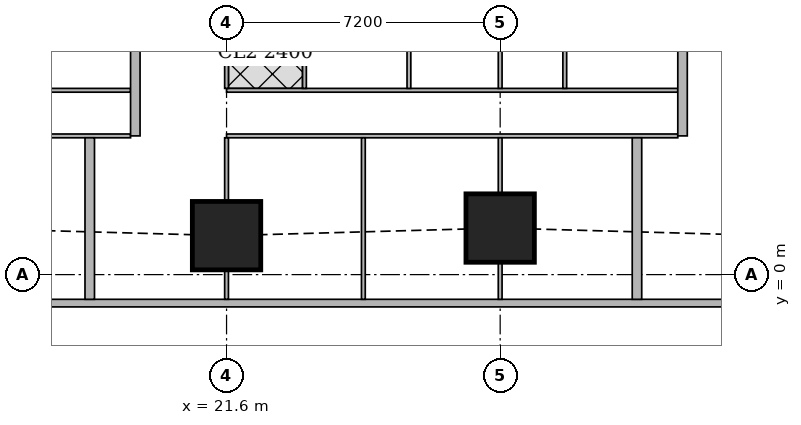
"""IFC4 building model, lengths in metres.
Left out: names, types, materials, properties, quantities, classifications, styles, units other than length and angle.
Written with IfcOpenShell. Run it as: python <this file> out.ifc"""

import sys

from ifc_helpers import new_model, si_unit, direction, frame, frame_2d, origin, origin_2d, place, context, subcontext, project, spatial, rectangle, extrude, element, fill, save


model = new_model("IFC4")
c1 = context("Model", 3, precision=1e-05, world=origin(), true_north=direction((0.0, 1.0)))
c2 = subcontext(c1, "Body", "Model", "MODEL_VIEW")
j1 = project(units=[si_unit("LENGTHUNIT", "METRE"), si_unit("PLANEANGLEUNIT", "RADIAN")], contexts=[c1])
p1 = place(None, origin())
s1 = spatial("IfcSite", under=j1, at=p1, CompositionType="ELEMENT")
p2 = place(p1, origin())
s2 = spatial("IfcBuilding", under=s1, at=p2, CompositionType="ELEMENT")
p3 = place(p2, frame((0.0, 0.0, 158.3)))
s3 = spatial("IfcBuildingStorey", under=s2, at=p3, CompositionType="ELEMENT", Elevation=158.3)
for number, where, z_axis, x_axis in (
    (1, (21.6, 1.025, 0.0), (0.0, 0.0, 1.0), (1.0, 0.0, 0.0)),
    (2, (28.8, 1.225, 0.0), (0.0, 0.0, 1.0), (1.0, 0.0, 0.0)),
):
    element("IfcColumn", number, at=place(p3, frame(where, z_axis=z_axis, x_axis=x_axis)), inside=s3, PredefinedType="COLUMN", context=c2, shape_type="SweptSolid", body=[
        extrude(rectangle(XDim=1.8, YDim=1.8, at=origin_2d()), origin(), (0.0, 0.0, 1.0), 3.75),
    ])
p4 = place(p3, frame((2.163, -0.75, 0.0), z_axis=(0.0, 0.0, 1.0), x_axis=(1.0, 0.0, 0.0)))
e3 = element("IfcWall", 3, at=p4, inside=s3, PredefinedType="SOLIDWALL", context=c2, shape_type="SweptSolid", body=[
    extrude(rectangle(XDim=45.628, YDim=0.2, at=frame_2d((22.814, 0.0))), origin(), (0.0, 0.0, 1.0), 3.5),
])
p5 = place(p4, frame((9.537, 0.0, 0.9)))
e4 = element("IfcOpeningElement", 4, at=p5, cuts=e3, PredefinedType="OPENING", context=c2, shape_type="SweptSolid", body=[
    extrude(rectangle(XDim=1.8, YDim=1.5, at=frame_2d((0.9, 0.75))), frame((0.0, 0.11, 0.0), z_axis=(0.0, -1.0, 0.0), x_axis=(1.0, 0.0, 0.0)), (0.0, 0.0, 1.0), 0.22),
])
p6 = place(p4, frame((13.137, 0.0, 0.9)))
e5 = element("IfcOpeningElement", 5, at=p6, cuts=e3, PredefinedType="OPENING", context=c2, shape_type="SweptSolid", body=[
    extrude(rectangle(XDim=1.8, YDim=1.5, at=frame_2d((0.9, 0.75))), frame((0.0, 0.11, 0.0), z_axis=(0.0, -1.0, 0.0), x_axis=(1.0, 0.0, 0.0)), (0.0, 0.0, 1.0), 0.22),
])
p7 = place(p4, frame((16.737, 0.0, 0.9)))
e6 = element("IfcOpeningElement", 6, at=p7, cuts=e3, PredefinedType="OPENING", context=c2, shape_type="SweptSolid", body=[
    extrude(rectangle(XDim=1.8, YDim=1.5, at=frame_2d((0.9, 0.75))), frame((0.0, 0.11, 0.0), z_axis=(0.0, -1.0, 0.0), x_axis=(1.0, 0.0, 0.0)), (0.0, 0.0, 1.0), 0.22),
])
p8 = place(p4, frame((20.337, 0.0, 0.9)))
e7 = element("IfcOpeningElement", 7, at=p8, cuts=e3, PredefinedType="OPENING", context=c2, shape_type="SweptSolid", body=[
    extrude(rectangle(XDim=1.8, YDim=1.5, at=frame_2d((0.9, 0.75))), frame((0.0, 0.11, 0.0), z_axis=(0.0, -1.0, 0.0), x_axis=(1.0, 0.0, 0.0)), (0.0, 0.0, 1.0), 0.22),
])
p9 = place(p4, frame((23.937, 0.0, 0.9)))
e8 = element("IfcOpeningElement", 8, at=p9, cuts=e3, PredefinedType="OPENING", context=c2, shape_type="SweptSolid", body=[
    extrude(rectangle(XDim=1.8, YDim=1.5, at=frame_2d((0.9, 0.75))), frame((0.0, 0.11, 0.0), z_axis=(0.0, -1.0, 0.0), x_axis=(1.0, 0.0, 0.0)), (0.0, 0.0, 1.0), 0.22),
])
p10 = place(p4, frame((27.537, 0.0, 0.9)))
e9 = element("IfcOpeningElement", 9, at=p10, cuts=e3, PredefinedType="OPENING", context=c2, shape_type="SweptSolid", body=[
    extrude(rectangle(XDim=1.8, YDim=1.5, at=frame_2d((0.9, 0.75))), frame((0.0, 0.11, 0.0), z_axis=(0.0, -1.0, 0.0), x_axis=(1.0, 0.0, 0.0)), (0.0, 0.0, 1.0), 0.22),
])
p11 = place(p4, frame((31.137, 0.0, 0.9)))
e10 = element("IfcOpeningElement", 10, at=p11, cuts=e3, PredefinedType="OPENING", context=c2, shape_type="SweptSolid", body=[
    extrude(rectangle(XDim=1.8, YDim=1.5, at=frame_2d((0.9, 0.75))), frame((0.0, 0.11, 0.0), z_axis=(0.0, -1.0, 0.0), x_axis=(1.0, 0.0, 0.0)), (0.0, 0.0, 1.0), 0.22),
])
p12 = place(p4, frame((34.737, 0.0, 0.9)))
e11 = element("IfcOpeningElement", 11, at=p12, cuts=e3, PredefinedType="OPENING", context=c2, shape_type="SweptSolid", body=[
    extrude(rectangle(XDim=1.8, YDim=1.5, at=frame_2d((0.9, 0.75))), frame((0.0, 0.11, 0.0), z_axis=(0.0, -1.0, 0.0), x_axis=(1.0, 0.0, 0.0)), (0.0, 0.0, 1.0), 0.22),
])
p13 = place(p3, frame((33.623, 43.022, 0.0), z_axis=(0.0, 0.0, 1.0), x_axis=(0.185596841028, -0.98262597798, 0.0)))
e12 = element("IfcWall", 12, at=p13, inside=s3, PredefinedType="SOLIDWALL", context=c2, shape_type="SweptSolid", body=[
    extrude(rectangle(XDim=41.66, YDim=0.15, at=frame_2d((20.83, 0.0))), origin(), (0.0, 0.0, 1.0), 2.5),
])
p14 = place(p13, frame((21.514, 0.0, 0.0)))
e13 = element("IfcOpeningElement", 13, at=p14, cuts=e12, PredefinedType="OPENING", context=c2, shape_type="SweptSolid", body=[
    extrude(rectangle(XDim=1.0, YDim=2.1, at=frame_2d((0.5, 1.05))), frame((0.0, 0.085, 0.0), z_axis=(0.0, -1.0, 0.0), x_axis=(1.0, 0.0, 0.0)), (0.0, 0.0, 1.0), 0.17),
])
p15 = place(p13, frame((27.062, 0.0, 0.0)))
e14 = element("IfcOpeningElement", 14, at=p15, cuts=e12, PredefinedType="OPENING", context=c2, shape_type="SweptSolid", body=[
    extrude(rectangle(XDim=1.0, YDim=2.1, at=frame_2d((0.5, 1.05))), frame((0.0, 0.085, 0.0), z_axis=(0.0, -1.0, 0.0), x_axis=(1.0, 0.0, 0.0)), (0.0, 0.0, 1.0), 0.17),
])
p16 = place(p13, frame((29.934, 0.0, 0.0)))
e15 = element("IfcOpeningElement", 15, at=p16, cuts=e12, PredefinedType="OPENING", context=c2, shape_type="SweptSolid", body=[
    extrude(rectangle(XDim=1.0, YDim=2.1, at=frame_2d((0.5, 1.05))), frame((0.0, 0.085, 0.0), z_axis=(0.0, -1.0, 0.0), x_axis=(1.0, 0.0, 0.0)), (0.0, 0.0, 1.0), 0.17),
])
p17 = place(p3, frame((19.074, 3.65, 0.0), z_axis=(0.0, 0.0, 1.0), x_axis=(-1.0, 0.0, 0.0)))
e16 = element("IfcWall", 16, at=p17, inside=s3, PredefinedType="PARTITIONING", context=c2, shape_type="SweptSolid", body=[
    extrude(rectangle(XDim=4.674, YDim=0.1, at=frame_2d((2.337, 0.0))), origin(), (0.0, 0.0, 1.0), 3.5),
])
p18 = place(p17, frame((3.574, 0.0, 0.0)))
e17 = element("IfcOpeningElement", 17, at=p18, cuts=e16, PredefinedType="OPENING", context=c2, shape_type="SweptSolid", body=[
    extrude(rectangle(XDim=0.9, YDim=2.1, at=frame_2d((0.45, 1.05))), frame((0.0, 0.06, 0.0), z_axis=(0.0, -1.0, 0.0), x_axis=(1.0, 0.0, 0.0)), (0.0, 0.0, 1.0), 0.12),
])
p19 = place(p3, frame((19.074, 4.85, 0.0), z_axis=(0.0, 0.0, 1.0), x_axis=(-1.0, 0.0, 0.0)))
e18 = element("IfcWall", 18, at=p19, inside=s3, PredefinedType="PARTITIONING", context=c2, shape_type="SweptSolid", body=[
    extrude(rectangle(XDim=4.674, YDim=0.1, at=frame_2d((2.337, 0.0))), origin(), (0.0, 0.0, 1.0), 3.5),
])
p20 = place(p19, frame((3.199, 0.0, 0.0)))
e19 = element("IfcOpeningElement", 19, at=p20, cuts=e18, PredefinedType="OPENING", context=c2, shape_type="SweptSolid", body=[
    extrude(rectangle(XDim=0.9, YDim=2.1, at=frame_2d((0.45, 1.05))), frame((0.0, 0.06, 0.0), z_axis=(0.0, -1.0, 0.0), x_axis=(1.0, 0.0, 0.0)), (0.0, 0.0, 1.0), 0.12),
])
p21 = place(p19, frame((0.799, 0.0, 0.0)))
e20 = element("IfcOpeningElement", 20, at=p21, cuts=e18, PredefinedType="OPENING", context=c2, shape_type="SweptSolid", body=[
    extrude(rectangle(XDim=0.9, YDim=2.1, at=frame_2d((0.45, 1.05))), frame((0.0, 0.06, 0.0), z_axis=(0.0, -1.0, 0.0), x_axis=(1.0, 0.0, 0.0)), (0.0, 0.0, 1.0), 0.12),
])
p22 = place(p3, frame((33.474, 3.65, 0.0), z_axis=(0.0, 0.0, 1.0), x_axis=(-1.0, 0.0, 0.0)))
e21 = element("IfcWall", 21, at=p22, inside=s3, PredefinedType="PARTITIONING", context=c2, shape_type="SweptSolid", body=[
    extrude(rectangle(XDim=11.874, YDim=0.1, at=frame_2d((5.937, 0.0))), origin(), (0.0, 0.0, 1.0), 3.5),
])
p23 = place(p22, frame((10.774, 0.0, 0.0)))
e22 = element("IfcOpeningElement", 22, at=p23, cuts=e21, PredefinedType="OPENING", context=c2, shape_type="SweptSolid", body=[
    extrude(rectangle(XDim=0.9, YDim=2.1, at=frame_2d((0.45, 1.05))), frame((0.0, 0.06, 0.0), z_axis=(0.0, -1.0, 0.0), x_axis=(1.0, 0.0, 0.0)), (0.0, 0.0, 1.0), 0.12),
])
p24 = place(p22, frame((7.174, 0.0, 0.0)))
e23 = element("IfcOpeningElement", 23, at=p24, cuts=e21, PredefinedType="OPENING", context=c2, shape_type="SweptSolid", body=[
    extrude(rectangle(XDim=0.9, YDim=2.1, at=frame_2d((0.45, 1.05))), frame((0.0, 0.06, 0.0), z_axis=(0.0, -1.0, 0.0), x_axis=(1.0, 0.0, 0.0)), (0.0, 0.0, 1.0), 0.12),
])
p25 = place(p22, frame((3.574, 0.0, 0.0)))
e24 = element("IfcOpeningElement", 24, at=p25, cuts=e21, PredefinedType="OPENING", context=c2, shape_type="SweptSolid", body=[
    extrude(rectangle(XDim=0.9, YDim=2.1, at=frame_2d((0.45, 1.05))), frame((0.0, 0.06, 0.0), z_axis=(0.0, -1.0, 0.0), x_axis=(1.0, 0.0, 0.0)), (0.0, 0.0, 1.0), 0.12),
])
p26 = place(p3, frame((33.474, 4.85, 0.0), z_axis=(0.0, 0.0, 1.0), x_axis=(-1.0, 0.0, 0.0)))
e25 = element("IfcWall", 25, at=p26, inside=s3, PredefinedType="PARTITIONING", context=c2, shape_type="SweptSolid", body=[
    extrude(rectangle(XDim=11.874, YDim=0.1, at=frame_2d((5.937, 0.0))), origin(), (0.0, 0.0, 1.0), 3.5),
])
p27 = place(p26, frame((10.399, 0.0, 0.0)))
e26 = element("IfcOpeningElement", 26, at=p27, cuts=e25, PredefinedType="OPENING", context=c2, shape_type="SweptSolid", body=[
    extrude(rectangle(XDim=0.9, YDim=2.1, at=frame_2d((0.45, 1.05))), frame((0.0, 0.06, 0.0), z_axis=(0.0, -1.0, 0.0), x_axis=(1.0, 0.0, 0.0)), (0.0, 0.0, 1.0), 0.12),
])
p28 = place(p26, frame((5.425, 0.0, 0.0)))
e27 = element("IfcOpeningElement", 27, at=p28, cuts=e25, PredefinedType="OPENING", context=c2, shape_type="SweptSolid", body=[
    extrude(rectangle(XDim=0.9, YDim=2.1, at=frame_2d((0.45, 1.05))), frame((0.0, 0.06, 0.0), z_axis=(0.0, -1.0, 0.0), x_axis=(1.0, 0.0, 0.0)), (0.0, 0.0, 1.0), 0.12),
])
p29 = place(p26, frame((3.374, 0.0, 0.0)))
e28 = element("IfcOpeningElement", 28, at=p29, cuts=e25, PredefinedType="OPENING", context=c2, shape_type="SweptSolid", body=[
    extrude(rectangle(XDim=0.9, YDim=2.1, at=frame_2d((0.45, 1.05))), frame((0.0, 0.06, 0.0), z_axis=(0.0, -1.0, 0.0), x_axis=(1.0, 0.0, 0.0)), (0.0, 0.0, 1.0), 0.12),
])
p30 = place(p26, frame((8.0, 0.0, 0.0)))
e29 = element("IfcOpeningElement", 29, at=p30, cuts=e25, PredefinedType="OPENING", context=c2, shape_type="SweptSolid", body=[
    extrude(rectangle(XDim=0.9, YDim=2.1, at=frame_2d((0.45, 1.05))), frame((0.0, 0.06, 0.0), z_axis=(0.0, -1.0, 0.0), x_axis=(1.0, 0.0, 0.0)), (0.0, 0.0, 1.0), 0.12),
])
p31 = place(p26, frame((0.975, 0.0, 0.0)))
e30 = element("IfcOpeningElement", 30, at=p31, cuts=e25, PredefinedType="OPENING", context=c2, shape_type="SweptSolid", body=[
    extrude(rectangle(XDim=0.9, YDim=2.1, at=frame_2d((0.45, 1.05))), frame((0.0, 0.06, 0.0), z_axis=(0.0, -1.0, 0.0), x_axis=(1.0, 0.0, 0.0)), (0.0, 0.0, 1.0), 0.12),
])
p32 = place(p3, frame((21.6, -0.65, 0.0), z_axis=(0.0, 0.0, 1.0), x_axis=(0.0, 1.0, 0.0)))
e31 = element("IfcWall", 31, at=p32, inside=s3, PredefinedType="PARTITIONING", context=c2, shape_type="SweptSolid", body=[
    extrude(rectangle(XDim=0.774, YDim=0.1, at=frame_2d((0.387, 0.0))), origin(), (0.0, 0.0, 1.0), 3.5),
])
p33 = place(p3, frame((21.6, 1.926, 0.0), z_axis=(0.0, 0.0, 1.0), x_axis=(0.0, 1.0, 0.0)))
e32 = element("IfcWall", 32, at=p33, inside=s3, PredefinedType="PARTITIONING", context=c2, shape_type="SweptSolid", body=[
    extrude(rectangle(XDim=1.674, YDim=0.1, at=frame_2d((0.837, 0.0))), origin(), (0.0, 0.0, 1.0), 3.5),
])
p34 = place(p3, frame((25.2, -0.65, 0.0), z_axis=(0.0, 0.0, 1.0), x_axis=(0.0, 1.0, 0.0)))
e33 = element("IfcWall", 33, at=p34, inside=s3, PredefinedType="PARTITIONING", context=c2, shape_type="SweptSolid", body=[
    extrude(rectangle(XDim=4.25, YDim=0.1, at=frame_2d((2.125, 0.0))), origin(), (0.0, 0.0, 1.0), 2.1),
])
p35 = place(p3, frame((28.8, -0.65, 0.0), z_axis=(0.0, 0.0, 1.0), x_axis=(0.0, 1.0, 0.0)))
e34 = element("IfcWall", 34, at=p35, inside=s3, PredefinedType="PARTITIONING", context=c2, shape_type="SweptSolid", body=[
    extrude(rectangle(XDim=0.974, YDim=0.1, at=frame_2d((0.487, 0.0))), origin(), (0.0, 0.0, 1.0), 3.5),
])
p36 = place(p3, frame((28.8, 2.126, 0.0), z_axis=(0.0, 0.0, 1.0), x_axis=(0.0, 1.0, 0.0)))
e35 = element("IfcWall", 35, at=p36, inside=s3, PredefinedType="PARTITIONING", context=c2, shape_type="SweptSolid", body=[
    extrude(rectangle(XDim=1.474, YDim=0.1, at=frame_2d((0.737, 0.0))), origin(), (0.0, 0.0, 1.0), 3.5),
])
p37 = place(p3, frame((21.6, 4.9, 0.0), z_axis=(0.0, 0.0, 1.0), x_axis=(0.0, 1.0, 0.0)))
e36 = element("IfcWall", 36, at=p37, inside=s3, PredefinedType="PARTITIONING", context=c2, shape_type="SweptSolid", body=[
    extrude(rectangle(XDim=1.849, YDim=0.1, at=frame_2d((0.925, 0.0))), origin(), (0.0, 0.0, 1.0), 3.5),
])
p38 = place(p3, frame((26.399, 4.9, 0.0), z_axis=(0.0, 0.0, 1.0), x_axis=(0.0, 1.0, 0.0)))
e37 = element("IfcWall", 37, at=p38, inside=s3, PredefinedType="PARTITIONING", context=c2, shape_type="SweptSolid", body=[
    extrude(rectangle(XDim=3.525, YDim=0.1, at=frame_2d((1.763, 0.0))), origin(), (0.0, 0.0, 1.0), 3.5),
])
p39 = place(p3, frame((28.8, 4.9, 0.0), z_axis=(0.0, 0.0, 1.0), x_axis=(0.0, 1.0, 0.0)))
e38 = element("IfcWall", 38, at=p39, inside=s3, PredefinedType="PARTITIONING", context=c2, shape_type="SweptSolid", body=[
    extrude(rectangle(XDim=1.849, YDim=0.1, at=frame_2d((0.925, 0.0))), origin(), (0.0, 0.0, 1.0), 3.5),
])
for number, where, z_axis, x_axis in (
    (39, (23.65, 4.9, 0.0), (0.0, 0.0, 1.0), (0.0, 1.0, 0.0)),
    (40, (30.5, 4.9, 0.0), (0.0, 0.0, 1.0), (0.0, 1.0, 0.0)),
):
    element("IfcWall", number, at=place(p3, frame(where, z_axis=z_axis, x_axis=x_axis)), inside=s3, PredefinedType="PARTITIONING", context=c2, shape_type="SweptSolid", body=[
        extrude(rectangle(XDim=3.525, YDim=0.1, at=frame_2d((1.763, 0.0))), origin(), (0.0, 0.0, 1.0), 3.5),
    ])
p40 = place(p3, frame((18.0, -0.65, 0.0), z_axis=(0.0, 0.0, 1.0), x_axis=(0.0, 1.0, 0.0)))
e41 = element("IfcWall", 41, at=p40, inside=s3, PredefinedType="SOLIDWALL", context=c2, shape_type="SweptSolid", body=[
    extrude(rectangle(XDim=4.25, YDim=0.25, at=frame_2d((2.125, 0.0))), origin(), (0.0, 0.0, 1.0), 2.1),
])
p41 = place(p3, frame((19.199, 3.65, 0.0), z_axis=(0.0, 0.0, 1.0), x_axis=(0.0, 1.0, 0.0)))
e42 = element("IfcWall", 42, at=p41, inside=s3, PredefinedType="SOLIDWALL", context=c2, shape_type="SweptSolid", body=[
    extrude(rectangle(XDim=4.775, YDim=0.25, at=frame_2d((2.388, 0.0))), origin(), (0.0, 0.0, 1.0), 3.5),
])
p42 = place(p3, frame((32.4, -0.65, 0.0), z_axis=(0.0, 0.0, 1.0), x_axis=(0.0, 1.0, 0.0)))
e43 = element("IfcWall", 43, at=p42, inside=s3, PredefinedType="SOLIDWALL", context=c2, shape_type="SweptSolid", body=[
    extrude(rectangle(XDim=4.25, YDim=0.25, at=frame_2d((2.125, 0.0))), origin(), (0.0, 0.0, 1.0), 2.1),
])
p43 = place(p3, frame((33.599, 3.65, 0.0), z_axis=(0.0, 0.0, 1.0), x_axis=(0.0, 1.0, 0.0)))
e44 = element("IfcWall", 44, at=p43, inside=s3, PredefinedType="SOLIDWALL", context=c2, shape_type="SweptSolid", body=[
    extrude(rectangle(XDim=4.775, YDim=0.25, at=frame_2d((2.388, 0.0))), origin(), (0.0, 0.0, 1.0), 3.5),
])
p44 = place(p6, origin())
e45 = element("IfcWindow", 45, at=p44, inside=s3, PartitioningType="SINGLE_PANEL", PredefinedType="WINDOW", context=c2, shape_type="SweptSolid", body=[
    extrude(rectangle(XDim=1.8, YDim=1.5, at=frame_2d((0.9, 0.75))), frame((0.0, 0.03, 0.0), z_axis=(0.0, -1.0, 0.0), x_axis=(1.0, 0.0, 0.0)), (0.0, 0.0, 1.0), 0.06),
])
fill(e5, e45)
p45 = place(p7, origin())
e46 = element("IfcWindow", 46, at=p45, inside=s3, PartitioningType="SINGLE_PANEL", PredefinedType="WINDOW", context=c2, shape_type="SweptSolid", body=[
    extrude(rectangle(XDim=1.8, YDim=1.5, at=frame_2d((0.9, 0.75))), frame((0.0, 0.03, 0.0), z_axis=(0.0, -1.0, 0.0), x_axis=(1.0, 0.0, 0.0)), (0.0, 0.0, 1.0), 0.06),
])
fill(e6, e46)
p46 = place(p8, origin())
e47 = element("IfcWindow", 47, at=p46, inside=s3, PartitioningType="SINGLE_PANEL", PredefinedType="WINDOW", context=c2, shape_type="SweptSolid", body=[
    extrude(rectangle(XDim=1.8, YDim=1.5, at=frame_2d((0.9, 0.75))), frame((0.0, 0.03, 0.0), z_axis=(0.0, -1.0, 0.0), x_axis=(1.0, 0.0, 0.0)), (0.0, 0.0, 1.0), 0.06),
])
fill(e7, e47)
p47 = place(p9, origin())
e48 = element("IfcWindow", 48, at=p47, inside=s3, PartitioningType="SINGLE_PANEL", PredefinedType="WINDOW", context=c2, shape_type="SweptSolid", body=[
    extrude(rectangle(XDim=1.8, YDim=1.5, at=frame_2d((0.9, 0.75))), frame((0.0, 0.03, 0.0), z_axis=(0.0, -1.0, 0.0), x_axis=(1.0, 0.0, 0.0)), (0.0, 0.0, 1.0), 0.06),
])
fill(e8, e48)
p48 = place(p10, origin())
e49 = element("IfcWindow", 49, at=p48, inside=s3, PartitioningType="SINGLE_PANEL", PredefinedType="WINDOW", context=c2, shape_type="SweptSolid", body=[
    extrude(rectangle(XDim=1.8, YDim=1.5, at=frame_2d((0.9, 0.75))), frame((0.0, 0.03, 0.0), z_axis=(0.0, -1.0, 0.0), x_axis=(1.0, 0.0, 0.0)), (0.0, 0.0, 1.0), 0.06),
])
fill(e9, e49)
p49 = place(p11, origin())
e50 = element("IfcWindow", 50, at=p49, inside=s3, PartitioningType="SINGLE_PANEL", PredefinedType="WINDOW", context=c2, shape_type="SweptSolid", body=[
    extrude(rectangle(XDim=1.8, YDim=1.5, at=frame_2d((0.9, 0.75))), frame((0.0, 0.03, 0.0), z_axis=(0.0, -1.0, 0.0), x_axis=(1.0, 0.0, 0.0)), (0.0, 0.0, 1.0), 0.06),
])
fill(e10, e50)
p50 = place(p21, origin())
e51 = element("IfcDoor", 51, at=p50, inside=s3, OperationType="SINGLE_SWING_RIGHT", PredefinedType="DOOR", context=c2, shape_type="SweptSolid", body=[
    extrude(rectangle(XDim=0.9, YDim=2.1, at=frame_2d((0.45, 1.05))), frame((0.0, 0.025, 0.0), z_axis=(0.0, -1.0, 0.0), x_axis=(1.0, 0.0, 0.0)), (0.0, 0.0, 1.0), 0.05),
])
fill(e20, e51)
p51 = place(p23, origin())
e52 = element("IfcDoor", 52, at=p51, inside=s3, OperationType="SINGLE_SWING_RIGHT", PredefinedType="DOOR", context=c2, shape_type="SweptSolid", body=[
    extrude(rectangle(XDim=0.9, YDim=2.1, at=frame_2d((0.45, 1.05))), frame((0.0, 0.025, 0.0), z_axis=(0.0, -1.0, 0.0), x_axis=(1.0, 0.0, 0.0)), (0.0, 0.0, 1.0), 0.05),
])
fill(e22, e52)
p52 = place(p24, origin())
e53 = element("IfcDoor", 53, at=p52, inside=s3, OperationType="SINGLE_SWING_RIGHT", PredefinedType="DOOR", context=c2, shape_type="SweptSolid", body=[
    extrude(rectangle(XDim=0.9, YDim=2.1, at=frame_2d((0.45, 1.05))), frame((0.0, 0.025, 0.0), z_axis=(0.0, -1.0, 0.0), x_axis=(1.0, 0.0, 0.0)), (0.0, 0.0, 1.0), 0.05),
])
fill(e23, e53)
p53 = place(p25, origin())
e54 = element("IfcDoor", 54, at=p53, inside=s3, OperationType="SINGLE_SWING_RIGHT", PredefinedType="DOOR", context=c2, shape_type="SweptSolid", body=[
    extrude(rectangle(XDim=0.9, YDim=2.1, at=frame_2d((0.45, 1.05))), frame((0.0, 0.025, 0.0), z_axis=(0.0, -1.0, 0.0), x_axis=(1.0, 0.0, 0.0)), (0.0, 0.0, 1.0), 0.05),
])
fill(e24, e54)
p54 = place(p27, origin())
e55 = element("IfcDoor", 55, at=p54, inside=s3, OperationType="SINGLE_SWING_LEFT", PredefinedType="DOOR", context=c2, shape_type="SweptSolid", body=[
    extrude(rectangle(XDim=0.9, YDim=2.1, at=frame_2d((0.45, 1.05))), frame((0.0, 0.025, 0.0), z_axis=(0.0, -1.0, 0.0), x_axis=(1.0, 0.0, 0.0)), (0.0, 0.0, 1.0), 0.05),
])
fill(e26, e55)
p55 = place(p28, origin())
e56 = element("IfcDoor", 56, at=p55, inside=s3, OperationType="SINGLE_SWING_RIGHT", PredefinedType="DOOR", context=c2, shape_type="SweptSolid", body=[
    extrude(rectangle(XDim=0.9, YDim=2.1, at=frame_2d((0.45, 1.05))), frame((0.0, 0.025, 0.0), z_axis=(0.0, -1.0, 0.0), x_axis=(1.0, 0.0, 0.0)), (0.0, 0.0, 1.0), 0.05),
])
fill(e27, e56)
p56 = place(p29, origin())
e57 = element("IfcDoor", 57, at=p56, inside=s3, OperationType="SINGLE_SWING_RIGHT", PredefinedType="DOOR", context=c2, shape_type="SweptSolid", body=[
    extrude(rectangle(XDim=0.9, YDim=2.1, at=frame_2d((0.45, 1.05))), frame((0.0, 0.025, 0.0), z_axis=(0.0, -1.0, 0.0), x_axis=(1.0, 0.0, 0.0)), (0.0, 0.0, 1.0), 0.05),
])
fill(e28, e57)
p57 = place(p30, origin())
e58 = element("IfcDoor", 58, at=p57, inside=s3, OperationType="SINGLE_SWING_LEFT", PredefinedType="DOOR", context=c2, shape_type="SweptSolid", body=[
    extrude(rectangle(XDim=0.9, YDim=2.1, at=frame_2d((0.45, 1.05))), frame((0.0, 0.025, 0.0), z_axis=(0.0, -1.0, 0.0), x_axis=(1.0, 0.0, 0.0)), (0.0, 0.0, 1.0), 0.05),
])
fill(e29, e58)
p58 = place(p31, origin())
e59 = element("IfcDoor", 59, at=p58, inside=s3, OperationType="SINGLE_SWING_RIGHT", PredefinedType="DOOR", context=c2, shape_type="SweptSolid", body=[
    extrude(rectangle(XDim=0.9, YDim=2.1, at=frame_2d((0.45, 1.05))), frame((0.0, 0.025, 0.0), z_axis=(0.0, -1.0, 0.0), x_axis=(1.0, 0.0, 0.0)), (0.0, 0.0, 1.0), 0.05),
])
fill(e30, e59)
save(model, sys.argv[1])
